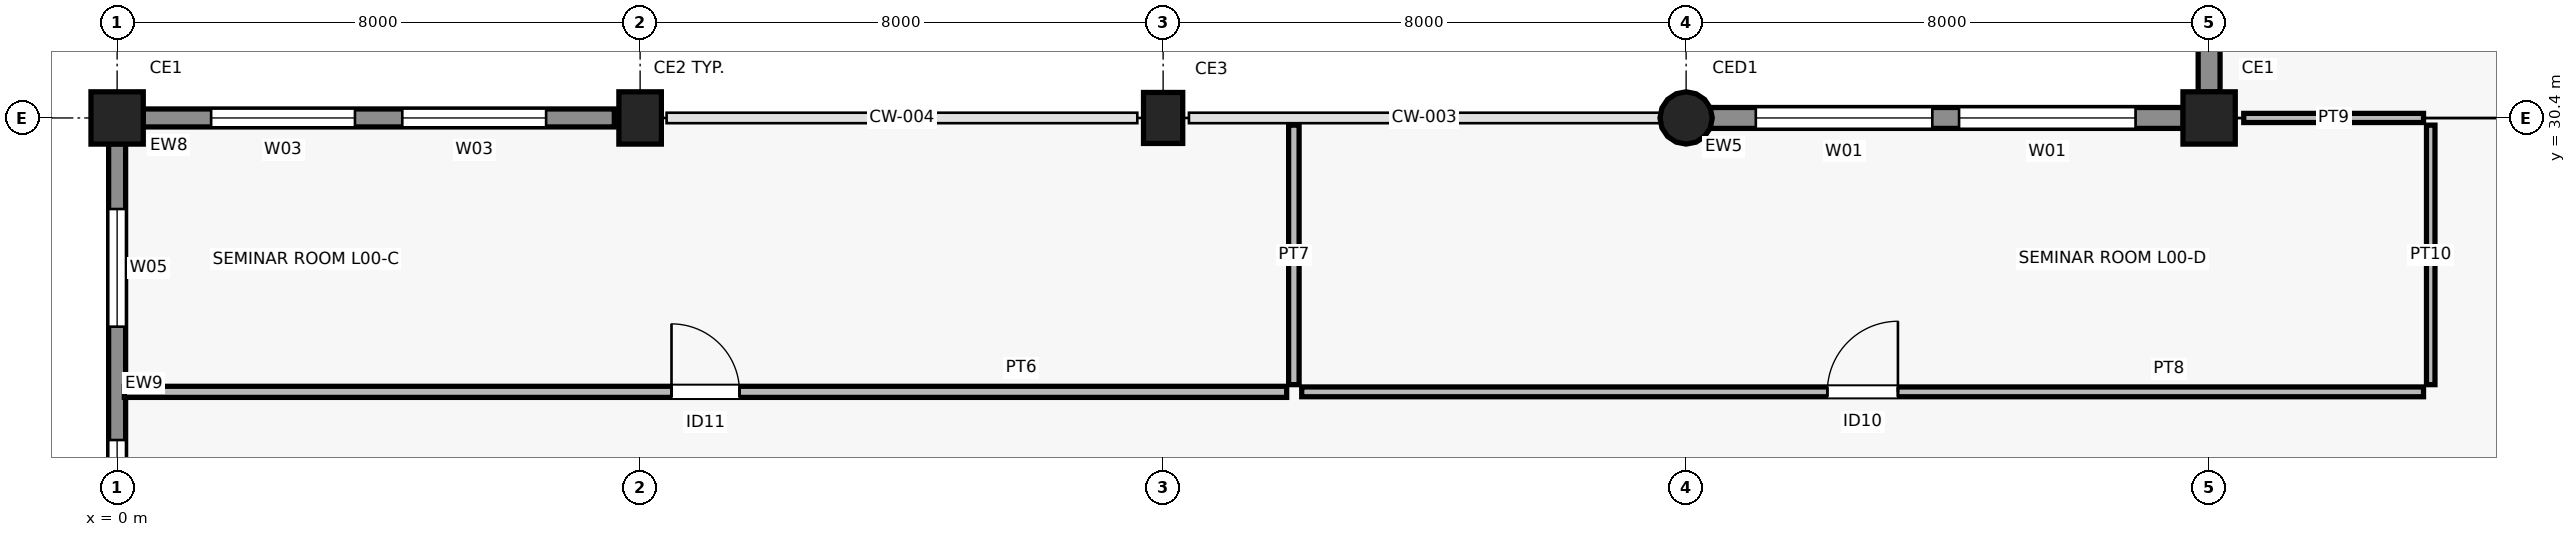
"""IFC4 building model, lengths in metres.
Left out: names, types, materials, properties, quantities, classifications, styles, units other than length and angle.
Written with IfcOpenShell. Run it as: python <this file> out.ifc"""

import sys

from ifc_helpers import new_model, si_unit, direction, frame, frame_2d, origin, origin_2d, place, context, subcontext, project, spatial, rectangle, circle, extrude, element, fill, save


model = new_model("IFC4")
c1 = context("Model", 3, precision=1e-05, world=origin(), true_north=direction((0.0, 1.0)))
c2 = subcontext(c1, "Body", "Model", "MODEL_VIEW")
j1 = project(units=[si_unit("LENGTHUNIT", "METRE"), si_unit("PLANEANGLEUNIT", "RADIAN")], contexts=[c1])
p1 = place(None, origin())
s1 = spatial("IfcSite", under=j1, at=p1, CompositionType="ELEMENT")
p2 = place(p1, origin())
s2 = spatial("IfcBuilding", under=s1, at=p2, CompositionType="ELEMENT")
p3 = place(p2, origin())
s3 = spatial("IfcBuildingStorey", under=s2, at=p3, CompositionType="ELEMENT", Elevation=0.0)
p4 = place(p3, frame((0.0, 30.4, 0.0), z_axis=(0.0, 0.0, 1.0), x_axis=(1.0, 0.0, 0.0)))
e1 = element("IfcColumn", 1, at=p4, inside=s3, PredefinedType="COLUMN", context=c2, shape_type="SweptSolid", body=[
    extrude(rectangle(XDim=0.8, YDim=0.8, at=origin_2d()), origin(), (0.0, 0.0, 1.0), 4.5),
])
p5 = place(p3, frame((8.0, 30.4, 0.0), z_axis=(0.0, 0.0, 1.0), x_axis=(1.0, 0.0, 0.0)))
e2 = element("IfcColumn", 2, at=p5, inside=s3, PredefinedType="COLUMN", context=c2, shape_type="SweptSolid", body=[
    extrude(rectangle(XDim=0.8, YDim=0.65, at=origin_2d()), origin(), (0.0, 0.0, 1.0), 4.5),
])
p6 = place(p3, frame((16.0, 30.4, 0.0), z_axis=(0.0, 0.0, 1.0), x_axis=(1.0, 0.0, 0.0)))
e3 = element("IfcColumn", 3, at=p6, inside=s3, PredefinedType="COLUMN", context=c2, shape_type="SweptSolid", body=[
    extrude(rectangle(XDim=0.78, YDim=0.6, at=origin_2d()), origin(), (0.0, 0.0, 1.0), 4.5),
])
p7 = place(p3, frame((24.0, 30.4, 0.0), z_axis=(0.0, 0.0, 1.0), x_axis=(1.0, 0.0, 0.0)))
e4 = element("IfcColumn", 4, at=p7, inside=s3, PredefinedType="COLUMN", context=c2, shape_type="SweptSolid", body=[
    extrude(circle(Radius=0.4, at=origin_2d()), origin(), (0.0, 0.0, 1.0), 4.5),
])
p8 = place(p3, frame((32.0, 30.4, 0.0), z_axis=(0.0, 0.0, 1.0), x_axis=(1.0, 0.0, 0.0)))
e5 = element("IfcColumn", 5, at=p8, inside=s3, PredefinedType="COLUMN", context=c2, shape_type="SweptSolid", body=[
    extrude(rectangle(XDim=0.8, YDim=0.8, at=origin_2d()), origin(), (0.0, 0.0, 1.0), 4.5),
])
p9 = place(p3, frame((32.0, 37.68, 0.0), z_axis=(0.0, 0.0, 1.0), x_axis=(0.0, -1.0, 0.0)))
e6 = element("IfcWall", 6, at=p9, inside=s3, PredefinedType="SOLIDWALL", context=c2, shape_type="SweptSolid", body=[
    extrude(rectangle(XDim=6.885, YDim=0.335, at=frame_2d((3.442, 0.0))), origin(), (0.0, 0.0, 1.0), 3.7),
])
p10 = place(p9, frame((2.142, 0.0, 0.9)))
e7 = element("IfcOpeningElement", 7, at=p10, cuts=e6, PredefinedType="OPENING", context=c2, shape_type="SweptSolid", body=[
    extrude(rectangle(XDim=2.6, YDim=1.65, at=frame_2d((1.3, 0.825))), frame((0.0, 0.177, 0.0), z_axis=(0.0, -1.0, 0.0), x_axis=(1.0, 0.0, 0.0)), (0.0, 0.0, 1.0), 0.355),
])
p11 = place(p3, frame((31.605, 30.4, 0.0), z_axis=(0.0, 0.0, 1.0), x_axis=(-1.0, 0.0, 0.0)))
e8 = element("IfcWall", 8, at=p11, inside=s3, PredefinedType="SOLIDWALL", context=c2, shape_type="SweptSolid", body=[
    extrude(rectangle(XDim=7.269, YDim=0.32, at=frame_2d((3.635, 0.0))), origin(), (0.0, 0.0, 1.0), 3.67),
])
p12 = place(p11, frame((0.73, 0.0, 0.9)))
e9 = element("IfcOpeningElement", 9, at=p12, cuts=e8, PredefinedType="OPENING", context=c2, shape_type="SweptSolid", body=[
    extrude(rectangle(XDim=2.7, YDim=1.8, at=frame_2d((1.35, 0.9))), frame((0.0, 0.17, 0.0), z_axis=(0.0, -1.0, 0.0), x_axis=(1.0, 0.0, 0.0)), (0.0, 0.0, 1.0), 0.34),
])
p13 = place(p11, frame((3.839, 0.0, 0.9)))
e10 = element("IfcOpeningElement", 10, at=p13, cuts=e8, PredefinedType="OPENING", context=c2, shape_type="SweptSolid", body=[
    extrude(rectangle(XDim=2.7, YDim=1.8, at=frame_2d((1.35, 0.9))), frame((0.0, 0.17, 0.0), z_axis=(0.0, -1.0, 0.0), x_axis=(1.0, 0.0, 0.0)), (0.0, 0.0, 1.0), 0.34),
])
p14 = place(p3, frame((7.605, 30.4, 0.0), z_axis=(0.0, 0.0, 1.0), x_axis=(-1.0, 0.0, 0.0)))
e11 = element("IfcWall", 11, at=p14, inside=s3, PredefinedType="SOLIDWALL", context=c2, shape_type="SweptSolid", body=[
    extrude(rectangle(XDim=7.21, YDim=0.275, at=frame_2d((3.605, 0.0))), origin(), (0.0, 0.0, 1.0), 3.54),
])
p15 = place(p14, frame((1.043, 0.0, 0.9)))
e12 = element("IfcOpeningElement", 12, at=p15, cuts=e11, PredefinedType="OPENING", context=c2, shape_type="SweptSolid", body=[
    extrude(rectangle(XDim=2.2, YDim=1.8, at=frame_2d((1.1, 0.9))), frame((0.0, 0.147, 0.0), z_axis=(0.0, -1.0, 0.0), x_axis=(1.0, 0.0, 0.0)), (0.0, 0.0, 1.0), 0.295),
])
p16 = place(p14, frame((3.967, 0.0, 0.9)))
e13 = element("IfcOpeningElement", 13, at=p16, cuts=e11, PredefinedType="OPENING", context=c2, shape_type="SweptSolid", body=[
    extrude(rectangle(XDim=2.2, YDim=1.8, at=frame_2d((1.1, 0.9))), frame((0.0, 0.147, 0.0), z_axis=(0.0, -1.0, 0.0), x_axis=(1.0, 0.0, 0.0)), (0.0, 0.0, 1.0), 0.295),
])
p17 = place(p3, frame((0.0, 30.005, 0.0), z_axis=(0.0, 0.0, 1.0), x_axis=(0.0, -1.0, 0.0)))
e14 = element("IfcWall", 14, at=p17, inside=s3, PredefinedType="SOLIDWALL", context=c2, shape_type="SweptSolid", body=[
    extrude(rectangle(XDim=6.869, YDim=0.26, at=frame_2d((3.435, 0.0))), origin(), (0.0, 0.0, 1.0), 3.6),
])
p18 = place(p17, frame((0.998, 0.0, 0.9)))
e15 = element("IfcOpeningElement", 15, at=p18, cuts=e14, PredefinedType="OPENING", context=c2, shape_type="SweptSolid", body=[
    extrude(rectangle(XDim=1.8, YDim=1.8, at=frame_2d((0.9, 0.9))), frame((0.0, 0.14, 0.0), z_axis=(0.0, -1.0, 0.0), x_axis=(1.0, 0.0, 0.0)), (0.0, 0.0, 1.0), 0.28),
])
p19 = place(p17, frame((4.532, 0.0, 0.9)))
e16 = element("IfcOpeningElement", 16, at=p19, cuts=e14, PredefinedType="OPENING", context=c2, shape_type="SweptSolid", body=[
    extrude(rectangle(XDim=1.6, YDim=1.8, at=frame_2d((0.8, 0.9))), frame((0.0, 0.14, 0.0), z_axis=(0.0, -1.0, 0.0), x_axis=(1.0, 0.0, 0.0)), (0.0, 0.0, 1.0), 0.28),
])
p20 = place(p3, frame((0.11, 26.21, 0.0), z_axis=(0.0, 0.0, 1.0), x_axis=(1.0, 0.0, 0.0)))
e17 = element("IfcWall", 17, at=p20, inside=s3, PredefinedType="PARTITIONING", context=c2, shape_type="SweptSolid", body=[
    extrude(rectangle(XDim=17.78, YDim=0.17, at=frame_2d((8.89, 0.0))), origin(), (0.0, 0.0, 1.0), 4.2),
])
p21 = place(p20, frame((8.37, 0.0, 0.0)))
e18 = element("IfcOpeningElement", 18, at=p21, cuts=e17, PredefinedType="OPENING", context=c2, shape_type="SweptSolid", body=[
    extrude(rectangle(XDim=1.04, YDim=2.15, at=frame_2d((0.52, 1.075))), frame((0.0, 0.095, 0.0), z_axis=(0.0, -1.0, 0.0), x_axis=(1.0, 0.0, 0.0)), (0.0, 0.0, 1.0), 0.19),
])
p22 = place(p3, frame((18.0, 26.32, 0.0), z_axis=(0.0, 0.0, 1.0), x_axis=(0.0, 1.0, 0.0)))
e19 = element("IfcWall", 19, at=p22, inside=s3, PredefinedType="PARTITIONING", context=c2, shape_type="SweptSolid", body=[
    extrude(rectangle(XDim=3.97, YDim=0.16, at=frame_2d((1.985, 0.0))), origin(), (0.0, 0.0, 1.0), 4.2),
])
p23 = place(p3, frame((18.12, 26.21, 0.0), z_axis=(0.0, 0.0, 1.0), x_axis=(1.0, 0.0, 0.0)))
e20 = element("IfcWall", 20, at=p23, inside=s3, PredefinedType="PARTITIONING", context=c2, shape_type="SweptSolid", body=[
    extrude(rectangle(XDim=17.16, YDim=0.15, at=frame_2d((8.58, 0.0))), origin(), (0.0, 0.0, 1.0), 4.2),
])
p24 = place(p23, frame((8.04, 0.0, 0.0)))
e21 = element("IfcOpeningElement", 21, at=p24, cuts=e20, PredefinedType="OPENING", context=c2, shape_type="SweptSolid", body=[
    extrude(rectangle(XDim=1.08, YDim=2.15, at=frame_2d((0.54, 1.075))), frame((0.0, 0.085, 0.0), z_axis=(0.0, -1.0, 0.0), x_axis=(1.0, 0.0, 0.0)), (0.0, 0.0, 1.0), 0.17),
])
p25 = place(p3, frame((32.53, 30.4, 0.0), z_axis=(0.0, 0.0, 1.0), x_axis=(1.0, 0.0, 0.0)))
e22 = element("IfcWall", 22, at=p25, inside=s3, PredefinedType="PARTITIONING", context=c2, shape_type="SweptSolid", body=[
    extrude(rectangle(XDim=2.75, YDim=0.14, at=frame_2d((1.375, 0.0))), origin(), (0.0, 0.0, 1.0), 3.56),
])
p26 = place(p3, frame((35.39, 26.32, 0.0), z_axis=(0.0, 0.0, 1.0), x_axis=(0.0, 1.0, 0.0)))
e23 = element("IfcWall", 23, at=p26, inside=s3, PredefinedType="PARTITIONING", context=c2, shape_type="SweptSolid", body=[
    extrude(rectangle(XDim=3.97, YDim=0.13, at=frame_2d((1.985, 0.0))), origin(), (0.0, 0.0, 1.0), 4.2),
])
p27 = place(p12, origin())
e24 = element("IfcWindow", 24, at=p27, inside=s3, PartitioningType="SINGLE_PANEL", PredefinedType="WINDOW", context=c2, shape_type="SweptSolid", body=[
    extrude(rectangle(XDim=2.7, YDim=1.8, at=frame_2d((1.35, 0.9))), frame((0.0, 0.03, 0.0), z_axis=(0.0, -1.0, 0.0), x_axis=(1.0, 0.0, 0.0)), (0.0, 0.0, 1.0), 0.06),
])
fill(e9, e24)
p28 = place(p13, origin())
e25 = element("IfcWindow", 25, at=p28, inside=s3, PartitioningType="SINGLE_PANEL", PredefinedType="WINDOW", context=c2, shape_type="SweptSolid", body=[
    extrude(rectangle(XDim=2.7, YDim=1.8, at=frame_2d((1.35, 0.9))), frame((0.0, 0.03, 0.0), z_axis=(0.0, -1.0, 0.0), x_axis=(1.0, 0.0, 0.0)), (0.0, 0.0, 1.0), 0.06),
])
fill(e10, e25)
p29 = place(p15, origin())
e26 = element("IfcWindow", 26, at=p29, inside=s3, PartitioningType="SINGLE_PANEL", PredefinedType="WINDOW", context=c2, shape_type="SweptSolid", body=[
    extrude(rectangle(XDim=2.2, YDim=1.8, at=frame_2d((1.1, 0.9))), frame((0.0, 0.03, 0.0), z_axis=(0.0, -1.0, 0.0), x_axis=(1.0, 0.0, 0.0)), (0.0, 0.0, 1.0), 0.06),
])
fill(e12, e26)
p30 = place(p16, origin())
e27 = element("IfcWindow", 27, at=p30, inside=s3, PartitioningType="SINGLE_PANEL", PredefinedType="WINDOW", context=c2, shape_type="SweptSolid", body=[
    extrude(rectangle(XDim=2.2, YDim=1.8, at=frame_2d((1.1, 0.9))), frame((0.0, 0.03, 0.0), z_axis=(0.0, -1.0, 0.0), x_axis=(1.0, 0.0, 0.0)), (0.0, 0.0, 1.0), 0.06),
])
fill(e13, e27)
p31 = place(p18, origin())
e28 = element("IfcWindow", 28, at=p31, inside=s3, PartitioningType="SINGLE_PANEL", PredefinedType="WINDOW", context=c2, shape_type="SweptSolid", body=[
    extrude(rectangle(XDim=1.8, YDim=1.8, at=frame_2d((0.9, 0.9))), frame((0.0, 0.03, 0.0), z_axis=(0.0, -1.0, 0.0), x_axis=(1.0, 0.0, 0.0)), (0.0, 0.0, 1.0), 0.06),
])
fill(e15, e28)
p32 = place(p19, origin())
e29 = element("IfcWindow", 29, at=p32, inside=s3, PartitioningType="SINGLE_PANEL", PredefinedType="WINDOW", context=c2, shape_type="SweptSolid", body=[
    extrude(rectangle(XDim=1.6, YDim=1.8, at=frame_2d((0.8, 0.9))), frame((0.0, 0.03, 0.0), z_axis=(0.0, -1.0, 0.0), x_axis=(1.0, 0.0, 0.0)), (0.0, 0.0, 1.0), 0.06),
])
fill(e16, e29)
p33 = place(p21, origin())
e30 = element("IfcDoor", 30, at=p33, inside=s3, OperationType="SINGLE_SWING_LEFT", PredefinedType="DOOR", context=c2, shape_type="SweptSolid", body=[
    extrude(rectangle(XDim=1.04, YDim=2.15, at=frame_2d((0.52, 1.075))), frame((0.0, 0.025, 0.0), z_axis=(0.0, -1.0, 0.0), x_axis=(1.0, 0.0, 0.0)), (0.0, 0.0, 1.0), 0.05),
])
fill(e18, e30)
p34 = place(p24, origin())
e31 = element("IfcDoor", 31, at=p34, inside=s3, OperationType="SINGLE_SWING_RIGHT", PredefinedType="DOOR", context=c2, shape_type="SweptSolid", body=[
    extrude(rectangle(XDim=1.08, YDim=2.15, at=frame_2d((0.54, 1.075))), frame((0.0, 0.025, 0.0), z_axis=(0.0, -1.0, 0.0), x_axis=(1.0, 0.0, 0.0)), (0.0, 0.0, 1.0), 0.05),
])
fill(e21, e31)
save(model, sys.argv[1])
